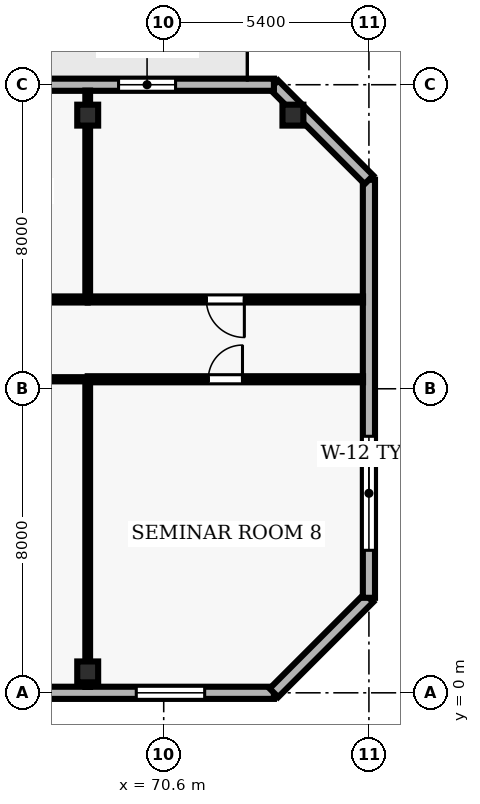
"""IFC4 building model, lengths in metres.
Left out: names, types, materials, properties, quantities, classifications, styles, units other than length and angle.
Written with IfcOpenShell. Run it as: python <this file> out.ifc"""

import sys

from ifc_helpers import new_model, si_unit, direction, frame, frame_2d, origin, origin_2d, place, context, subcontext, project, spatial, rectangle, hollow_rectangle, extrude, element, fill, save


model = new_model("IFC4")
c1 = context("Model", 3, precision=1e-05, world=origin(), true_north=direction((0.0, 1.0)))
c2 = subcontext(c1, "Body", "Model", "MODEL_VIEW")
j1 = project(units=[si_unit("LENGTHUNIT", "METRE"), si_unit("PLANEANGLEUNIT", "RADIAN")], contexts=[c1])
p1 = place(None, origin())
s1 = spatial("IfcSite", under=j1, at=p1, CompositionType="ELEMENT")
p2 = place(p1, origin())
s2 = spatial("IfcBuilding", under=s1, at=p2, CompositionType="ELEMENT")
p3 = place(p2, frame((0.0, 0.0, 89.5)))
s3 = spatial("IfcBuildingStorey", under=s2, at=p3, CompositionType="ELEMENT", Elevation=89.5)
for number, where, z_axis, x_axis in (
    (1, (68.6, 0.55, 0.0), (0.0, 0.0, 1.0), (1.0, 0.0, 0.0)),
    (2, (68.6, 15.2, 0.0), (0.0, 0.0, 1.0), (1.0, 0.0, 0.0)),
    (3, (74.0, 15.2, 0.0), (0.0, 0.0, 1.0), (1.0, 0.0, 0.0)),
):
    element("IfcColumn", number, at=place(p3, frame(where, z_axis=z_axis, x_axis=x_axis)), inside=s3, PredefinedType="COLUMN", context=c2, shape_type="SweptSolid", body=[
        extrude(hollow_rectangle(XDim=0.55, YDim=0.55, WallThickness=0.025, at=origin_2d()), origin(), (0.0, 0.0, 1.0), 3.9),
    ])
p4 = place(p3, frame((24.5, 0.0, 0.0), z_axis=(0.0, 0.0, 1.0), x_axis=(1.0, 0.0, 0.0)))
e4 = element("IfcWall", 4, at=p4, inside=s3, PredefinedType="SOLIDWALL", context=c2, shape_type="SweptSolid", body=[
    extrude(rectangle(XDim=49.0, YDim=0.32, at=frame_2d((24.5, 0.0))), origin(), (0.0, 0.0, 1.0), 3.64),
])
p5 = place(p4, frame((1.822, 0.0, 0.9)))
e5 = element("IfcOpeningElement", 5, at=p5, cuts=e4, PredefinedType="OPENING", context=c2, shape_type="SweptSolid", body=[
    extrude(rectangle(XDim=1.8, YDim=2.2, at=frame_2d((0.9, 1.1))), frame((0.0, 0.17, 0.0), z_axis=(0.0, -1.0, 0.0), x_axis=(1.0, 0.0, 0.0)), (0.0, 0.0, 1.0), 0.34),
])
p6 = place(p4, frame((18.156, 0.0, 0.9)))
e6 = element("IfcOpeningElement", 6, at=p6, cuts=e4, PredefinedType="OPENING", context=c2, shape_type="SweptSolid", body=[
    extrude(rectangle(XDim=1.8, YDim=2.2, at=frame_2d((0.9, 1.1))), frame((0.0, 0.17, 0.0), z_axis=(0.0, -1.0, 0.0), x_axis=(1.0, 0.0, 0.0)), (0.0, 0.0, 1.0), 0.34),
])
p7 = place(p4, frame((22.7, 0.0, 0.9)))
e7 = element("IfcOpeningElement", 7, at=p7, cuts=e4, PredefinedType="OPENING", context=c2, shape_type="SweptSolid", body=[
    extrude(rectangle(XDim=1.8, YDim=2.2, at=frame_2d((0.9, 1.1))), frame((0.0, 0.17, 0.0), z_axis=(0.0, -1.0, 0.0), x_axis=(1.0, 0.0, 0.0)), (0.0, 0.0, 1.0), 0.34),
])
p8 = place(p4, frame((29.044, 0.0, 0.9)))
e8 = element("IfcOpeningElement", 8, at=p8, cuts=e4, PredefinedType="OPENING", context=c2, shape_type="SweptSolid", body=[
    extrude(rectangle(XDim=1.8, YDim=2.2, at=frame_2d((0.9, 1.1))), frame((0.0, 0.17, 0.0), z_axis=(0.0, -1.0, 0.0), x_axis=(1.0, 0.0, 0.0)), (0.0, 0.0, 1.0), 0.34),
])
p9 = place(p4, frame((35.389, 0.0, 0.9)))
e9 = element("IfcOpeningElement", 9, at=p9, cuts=e4, PredefinedType="OPENING", context=c2, shape_type="SweptSolid", body=[
    extrude(rectangle(XDim=1.8, YDim=2.2, at=frame_2d((0.9, 1.1))), frame((0.0, 0.17, 0.0), z_axis=(0.0, -1.0, 0.0), x_axis=(1.0, 0.0, 0.0)), (0.0, 0.0, 1.0), 0.34),
])
p10 = place(p4, frame((39.933, 0.0, 0.9)))
e10 = element("IfcOpeningElement", 10, at=p10, cuts=e4, PredefinedType="OPENING", context=c2, shape_type="SweptSolid", body=[
    extrude(rectangle(XDim=1.8, YDim=2.2, at=frame_2d((0.9, 1.1))), frame((0.0, 0.17, 0.0), z_axis=(0.0, -1.0, 0.0), x_axis=(1.0, 0.0, 0.0)), (0.0, 0.0, 1.0), 0.34),
])
p11 = place(p4, frame((45.378, 0.0, 0.9)))
e11 = element("IfcOpeningElement", 11, at=p11, cuts=e4, PredefinedType="OPENING", context=c2, shape_type="SweptSolid", body=[
    extrude(rectangle(XDim=1.8, YDim=2.2, at=frame_2d((0.9, 1.1))), frame((0.0, 0.17, 0.0), z_axis=(0.0, -1.0, 0.0), x_axis=(1.0, 0.0, 0.0)), (0.0, 0.0, 1.0), 0.34),
])
p12 = place(p3, frame((73.5, 0.0, 0.0), z_axis=(0.0, 0.0, 1.0), x_axis=(0.707106781187, 0.707106781187, 0.0)))
e12 = element("IfcWall", 12, at=p12, inside=s3, PredefinedType="SOLIDWALL", context=c2, shape_type="SweptSolid", body=[
    extrude(rectangle(XDim=3.536, YDim=0.32, at=frame_2d((1.768, 0.0))), origin(), (0.0, 0.0, 1.0), 3.64),
])
p13 = place(p3, frame((76.0, 2.5, 0.0), z_axis=(0.0, 0.0, 1.0), x_axis=(0.0, 1.0, 0.0)))
e13 = element("IfcWall", 13, at=p13, inside=s3, PredefinedType="SOLIDWALL", context=c2, shape_type="SweptSolid", body=[
    extrude(rectangle(XDim=11.0, YDim=0.32, at=frame_2d((5.5, 0.0))), origin(), (0.0, 0.0, 1.0), 3.64),
])
p14 = place(p13, frame((1.25, 0.0, 0.9)))
e14 = element("IfcOpeningElement", 14, at=p14, cuts=e13, PredefinedType="OPENING", context=c2, shape_type="SweptSolid", body=[
    extrude(rectangle(XDim=3.0, YDim=2.2, at=frame_2d((1.5, 1.1))), frame((0.0, 0.17, 0.0), z_axis=(0.0, -1.0, 0.0), x_axis=(1.0, 0.0, 0.0)), (0.0, 0.0, 1.0), 0.34),
])
p15 = place(p3, frame((76.0, 13.5, 0.0), z_axis=(0.0, 0.0, 1.0), x_axis=(-0.707106781187, 0.707106781187, 0.0)))
e15 = element("IfcWall", 15, at=p15, inside=s3, PredefinedType="SOLIDWALL", context=c2, shape_type="SweptSolid", body=[
    extrude(rectangle(XDim=3.536, YDim=0.32, at=frame_2d((1.768, 0.0))), origin(), (0.0, 0.0, 1.0), 3.64),
])
p16 = place(p3, frame((73.5, 16.0, 0.0), z_axis=(0.0, 0.0, 1.0), x_axis=(-1.0, 0.0, 0.0)))
e16 = element("IfcWall", 16, at=p16, inside=s3, PredefinedType="SOLIDWALL", context=c2, shape_type="SweptSolid", body=[
    extrude(rectangle(XDim=26.7, YDim=0.32, at=frame_2d((13.35, 0.0))), origin(), (0.0, 0.0, 1.0), 3.64),
])
p17 = place(p16, frame((17.35, 0.0, 0.0)))
e17 = element("IfcOpeningElement", 17, at=p17, cuts=e16, PredefinedType="OPENING", context=c2, shape_type="SweptSolid", body=[
    extrude(rectangle(XDim=1.0, YDim=2.2, at=frame_2d((0.5, 1.1))), frame((0.0, 0.17, 0.0), z_axis=(0.0, -1.0, 0.0), x_axis=(1.0, 0.0, 0.0)), (0.0, 0.0, 1.0), 0.34),
])
p18 = place(p16, frame((2.588, 0.0, 0.9)))
e18 = element("IfcOpeningElement", 18, at=p18, cuts=e16, PredefinedType="OPENING", context=c2, shape_type="SweptSolid", body=[
    extrude(rectangle(XDim=1.5, YDim=1.6, at=frame_2d((0.75, 0.8))), frame((0.0, 0.17, 0.0), z_axis=(0.0, -1.0, 0.0), x_axis=(1.0, 0.0, 0.0)), (0.0, 0.0, 1.0), 0.34),
])
p19 = place(p3, frame((59.24, 8.25, 0.0), z_axis=(0.0, 0.0, 1.0), x_axis=(1.0, 0.0, 0.0)))
e19 = element("IfcWall", 19, at=p19, inside=s3, PredefinedType="MOVABLE", context=c2, shape_type="SweptSolid", body=[
    extrude(rectangle(XDim=9.36, YDim=0.11, at=frame_2d((4.68, 0.0))), origin(), (0.0, 0.0, 1.0), 3.64),
])
p20 = place(p19, frame((4.23, 0.0, 0.0)))
e20 = element("IfcOpeningElement", 20, at=p20, cuts=e19, PredefinedType="OPENING", context=c2, shape_type="SweptSolid", body=[
    extrude(rectangle(XDim=0.9, YDim=2.1, at=frame_2d((0.45, 1.05))), frame((0.0, 0.065, 0.0), z_axis=(0.0, -1.0, 0.0), x_axis=(1.0, 0.0, 0.0)), (0.0, 0.0, 1.0), 0.13),
])
p21 = place(p3, frame((68.6, 8.25, 0.0), z_axis=(0.0, 0.0, 1.0), x_axis=(1.0, 0.0, 0.0)))
e21 = element("IfcWall", 21, at=p21, inside=s3, PredefinedType="PARTITIONING", context=c2, shape_type="SweptSolid", body=[
    extrude(rectangle(XDim=7.245, YDim=0.16, at=frame_2d((3.623, 0.0))), origin(), (0.0, 0.0, 1.0), 3.64),
])
p22 = place(p21, frame((3.173, 0.0, 0.0)))
e22 = element("IfcOpeningElement", 22, at=p22, cuts=e21, PredefinedType="OPENING", context=c2, shape_type="SweptSolid", body=[
    extrude(rectangle(XDim=0.9, YDim=2.1, at=frame_2d((0.45, 1.05))), frame((0.0, 0.09, 0.0), z_axis=(0.0, -1.0, 0.0), x_axis=(1.0, 0.0, 0.0)), (0.0, 0.0, 1.0), 0.18),
])
p23 = place(p3, frame((68.6, 10.35, 0.0), z_axis=(0.0, 0.0, 1.0), x_axis=(-1.0, 0.0, 0.0)))
e23 = element("IfcWall", 23, at=p23, inside=s3, PredefinedType="PARTITIONING", context=c2, shape_type="SweptSolid", body=[
    extrude(rectangle(XDim=9.36, YDim=0.16, at=frame_2d((4.68, 0.0))), origin(), (0.0, 0.0, 1.0), 3.227),
])
p24 = place(p23, frame((4.18, 0.0, 0.0)))
e24 = element("IfcOpeningElement", 24, at=p24, cuts=e23, PredefinedType="OPENING", context=c2, shape_type="SweptSolid", body=[
    extrude(rectangle(XDim=1.0, YDim=2.1, at=frame_2d((0.5, 1.05))), frame((0.0, 0.09, 0.0), z_axis=(0.0, -1.0, 0.0), x_axis=(1.0, 0.0, 0.0)), (0.0, 0.0, 1.0), 0.18),
])
p25 = place(p3, frame((75.845, 10.35, 0.0), z_axis=(0.0, 0.0, 1.0), x_axis=(-1.0, 0.0, 0.0)))
e25 = element("IfcWall", 25, at=p25, inside=s3, PredefinedType="PARTITIONING", context=c2, shape_type="SweptSolid", body=[
    extrude(rectangle(XDim=7.245, YDim=0.16, at=frame_2d((3.623, 0.0))), origin(), (0.0, 0.0, 1.0), 3.64),
])
p26 = place(p25, frame((3.123, 0.0, 0.0)))
e26 = element("IfcOpeningElement", 26, at=p26, cuts=e25, PredefinedType="OPENING", context=c2, shape_type="SweptSolid", body=[
    extrude(rectangle(XDim=1.0, YDim=2.1, at=frame_2d((0.5, 1.05))), frame((0.0, 0.09, 0.0), z_axis=(0.0, -1.0, 0.0), x_axis=(1.0, 0.0, 0.0)), (0.0, 0.0, 1.0), 0.18),
])
p27 = place(p3, frame((68.6, 0.155, 0.0), z_axis=(0.0, 0.0, 1.0), x_axis=(0.0, 1.0, 0.0)))
e27 = element("IfcWall", 27, at=p27, inside=s3, PredefinedType="PARTITIONING", context=c2, shape_type="SweptSolid", body=[
    extrude(rectangle(XDim=8.02, YDim=0.125, at=frame_2d((4.01, 0.0))), origin(), (0.0, 0.0, 1.0), 3.005),
])
p28 = place(p3, frame((68.6, 10.425, 0.0), z_axis=(0.0, 0.0, 1.0), x_axis=(0.0, 1.0, 0.0)))
e28 = element("IfcWall", 28, at=p28, inside=s3, PredefinedType="PARTITIONING", context=c2, shape_type="SweptSolid", body=[
    extrude(rectangle(XDim=5.42, YDim=0.125, at=frame_2d((2.71, 0.0))), origin(), (0.0, 0.0, 1.0), 3.005),
])
p29 = place(p11, origin())
e29 = element("IfcWindow", 29, at=p29, inside=s3, PartitioningType="SINGLE_PANEL", PredefinedType="WINDOW", context=c2, shape_type="SweptSolid", body=[
    extrude(rectangle(XDim=1.8, YDim=2.2, at=frame_2d((0.9, 1.1))), frame((0.0, 0.03, 0.0), z_axis=(0.0, -1.0, 0.0), x_axis=(1.0, 0.0, 0.0)), (0.0, 0.0, 1.0), 0.06),
])
fill(e11, e29)
p30 = place(p14, origin())
e30 = element("IfcWindow", 30, at=p30, inside=s3, PartitioningType="SINGLE_PANEL", PredefinedType="WINDOW", context=c2, shape_type="SweptSolid", body=[
    extrude(rectangle(XDim=3.0, YDim=2.2, at=frame_2d((1.5, 1.1))), frame((0.0, 0.03, 0.0), z_axis=(0.0, -1.0, 0.0), x_axis=(1.0, 0.0, 0.0)), (0.0, 0.0, 1.0), 0.06),
])
fill(e14, e30)
p31 = place(p18, origin())
e31 = element("IfcWindow", 31, at=p31, inside=s3, PartitioningType="SINGLE_PANEL", PredefinedType="WINDOW", context=c2, shape_type="SweptSolid", body=[
    extrude(rectangle(XDim=1.5, YDim=1.6, at=frame_2d((0.75, 0.8))), frame((0.0, 0.03, 0.0), z_axis=(0.0, -1.0, 0.0), x_axis=(1.0, 0.0, 0.0)), (0.0, 0.0, 1.0), 0.06),
])
fill(e18, e31)
p32 = place(p22, origin())
e32 = element("IfcDoor", 32, at=p32, inside=s3, OperationType="SINGLE_SWING_RIGHT", PredefinedType="DOOR", context=c2, shape_type="SweptSolid", body=[
    extrude(rectangle(XDim=0.9, YDim=2.1, at=frame_2d((0.45, 1.05))), frame((0.0, 0.025, 0.0), z_axis=(0.0, -1.0, 0.0), x_axis=(1.0, 0.0, 0.0)), (0.0, 0.0, 1.0), 0.05),
])
fill(e22, e32)
p33 = place(p26, origin())
e33 = element("IfcDoor", 33, at=p33, inside=s3, OperationType="SINGLE_SWING_LEFT", PredefinedType="DOOR", context=c2, shape_type="SweptSolid", body=[
    extrude(rectangle(XDim=1.0, YDim=2.1, at=frame_2d((0.5, 1.05))), frame((0.0, 0.025, 0.0), z_axis=(0.0, -1.0, 0.0), x_axis=(1.0, 0.0, 0.0)), (0.0, 0.0, 1.0), 0.05),
])
fill(e26, e33)
save(model, sys.argv[1])
